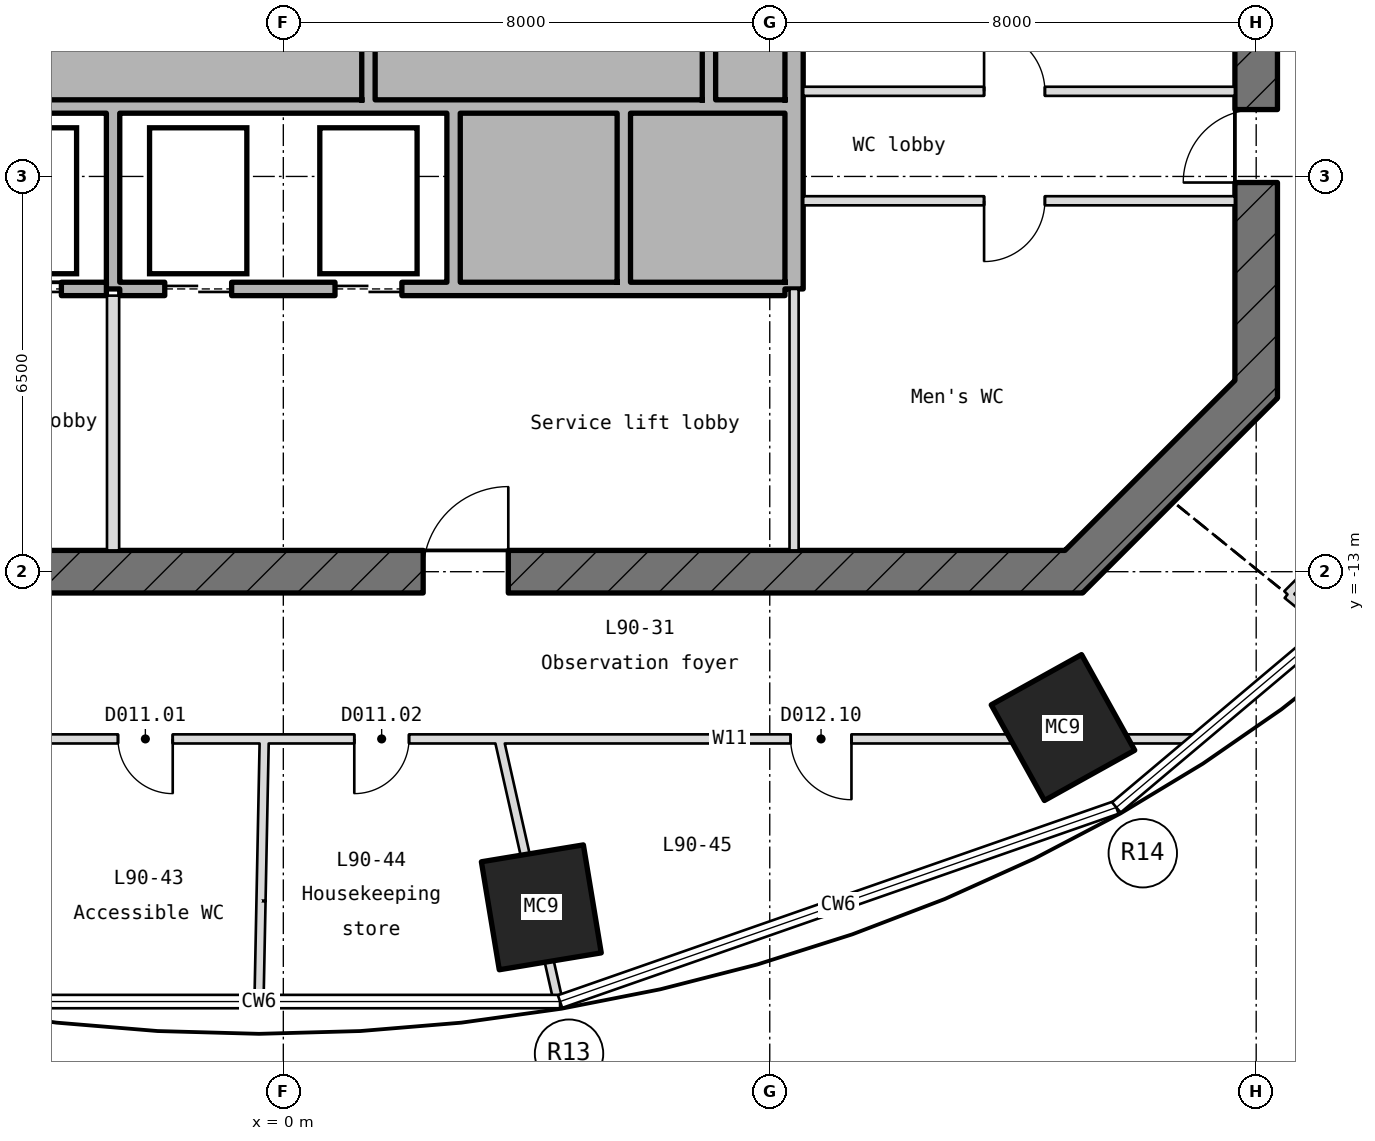
"""IFC4 building model, lengths in metres.
Left out: names, types, materials, properties, quantities, classifications, styles, units other than length and angle.
Written with IfcOpenShell. Run it as: python <this file> out.ifc"""

import sys

from ifc_helpers import new_model, si_unit, direction, frame, frame_2d, origin, origin_2d, place, context, subcontext, project, spatial, rectangle, hollow_rectangle, extrude, element, fill, save


model = new_model("IFC4")
c1 = context("Model", 3, precision=1e-05, world=origin(), true_north=direction((0.0, 1.0)))
c2 = subcontext(c1, "Body", "Model", "MODEL_VIEW")
j1 = project(units=[si_unit("LENGTHUNIT", "METRE"), si_unit("PLANEANGLEUNIT", "RADIAN")], contexts=[c1])
p1 = place(None, origin())
s1 = spatial("IfcSite", under=j1, at=p1, CompositionType="ELEMENT")
p2 = place(p1, origin())
s2 = spatial("IfcBuilding", under=s1, at=p2, CompositionType="ELEMENT")
p3 = place(p2, frame((0.0, 0.0, 396.55)))
s3 = spatial("IfcBuildingStorey", under=s2, at=p3, CompositionType="ELEMENT", Elevation=396.55)
for number, where, z_axis, x_axis in (
    (1, (4.243, -18.52, -0.25), (0.0, 0.0, 1.0), (-0.987, -0.163, 0.0)),
    (2, (12.823, -15.563, -0.25), (0.0, 0.0, 1.0), (-0.874, -0.486, 0.0)),
):
    element("IfcColumn", number, at=place(p3, frame(where, z_axis=z_axis, x_axis=x_axis)), inside=s3, PredefinedType="COLUMN", context=c2, shape_type="SweptSolid", body=[
        extrude(hollow_rectangle(XDim=1.7, YDim=1.8, WallThickness=0.05, at=origin_2d()), origin(), (0.0, 0.0, 1.0), 5.4),
    ])
p4 = place(p3, frame((12.897, -13.103, -0.25), z_axis=(0.0, 0.0, 1.0), x_axis=(0.707106781187, 0.707106781187, 0.0)))
e3 = element("IfcWall", 3, at=p4, inside=s3, PredefinedType="SHEAR", context=c2, shape_type="SweptSolid", body=[
    extrude(rectangle(XDim=4.533, YDim=0.7, at=frame_2d((2.266, 0.0))), origin(), (0.0, 0.0, 1.0), 5.4),
])
p5 = place(p3, frame((16.0, -10.145, -0.25), z_axis=(0.0, 0.0, 1.0), x_axis=(0.0, 1.0, 0.0)))
e4 = element("IfcWall", 4, at=p5, inside=s3, PredefinedType="SHEAR", context=c2, shape_type="SweptSolid", body=[
    extrude(rectangle(XDim=20.29, YDim=0.7, at=frame_2d((10.145, 0.0))), origin(), (0.0, 0.0, 1.0), 5.4),
])
p6 = place(p5, frame((8.945, 0.0, 0.25)))
e5 = element("IfcOpeningElement", 5, at=p6, cuts=e4, PredefinedType="OPENING", context=c2, shape_type="SweptSolid", body=[
    extrude(rectangle(XDim=2.4, YDim=2.1, at=frame_2d((1.2, 1.05))), frame((0.0, 0.36, 0.0), z_axis=(0.0, -1.0, 0.0), x_axis=(1.0, 0.0, 0.0)), (0.0, 0.0, 1.0), 0.72),
])
p7 = place(p5, frame((13.545, 0.0, 0.25)))
e6 = element("IfcOpeningElement", 6, at=p7, cuts=e4, PredefinedType="OPENING", context=c2, shape_type="SweptSolid", body=[
    extrude(rectangle(XDim=1.2, YDim=2.1, at=frame_2d((0.6, 1.05))), frame((0.0, 0.36, 0.0), z_axis=(0.0, -1.0, 0.0), x_axis=(1.0, 0.0, 0.0)), (0.0, 0.0, 1.0), 0.72),
])
p8 = place(p5, frame((3.545, 0.0, 0.25)))
e7 = element("IfcOpeningElement", 7, at=p8, cuts=e4, PredefinedType="OPENING", context=c2, shape_type="SweptSolid", body=[
    extrude(rectangle(XDim=1.2, YDim=2.1, at=frame_2d((0.6, 1.05))), frame((0.0, 0.36, 0.0), z_axis=(0.0, -1.0, 0.0), x_axis=(1.0, 0.0, 0.0)), (0.0, 0.0, 1.0), 0.72),
])
p9 = place(p3, frame((-13.145, -13.0, -0.25), z_axis=(0.0, 0.0, 1.0), x_axis=(1.0, 0.0, 0.0)))
e8 = element("IfcWall", 8, at=p9, inside=s3, PredefinedType="SHEAR", context=c2, shape_type="SweptSolid", body=[
    extrude(rectangle(XDim=26.29, YDim=0.7, at=frame_2d((13.145, 0.0))), origin(), (0.0, 0.0, 1.0), 5.4),
])
p10 = place(p9, frame((2.845, 0.0, 0.25)))
e9 = element("IfcOpeningElement", 9, at=p10, cuts=e8, PredefinedType="OPENING", context=c2, shape_type="SweptSolid", body=[
    extrude(rectangle(XDim=1.2, YDim=2.1, at=frame_2d((0.6, 1.05))), frame((0.0, 0.36, 0.0), z_axis=(0.0, -1.0, 0.0), x_axis=(1.0, 0.0, 0.0)), (0.0, 0.0, 1.0), 0.72),
])
p11 = place(p9, frame((6.845, 0.0, 0.25)))
e10 = element("IfcOpeningElement", 10, at=p11, cuts=e8, PredefinedType="OPENING", context=c2, shape_type="SweptSolid", body=[
    extrude(rectangle(XDim=1.4, YDim=2.1, at=frame_2d((0.7, 1.05))), frame((0.0, 0.36, 0.0), z_axis=(0.0, -1.0, 0.0), x_axis=(1.0, 0.0, 0.0)), (0.0, 0.0, 1.0), 0.72),
])
p12 = place(p9, frame((15.445, 0.0, 0.25)))
e11 = element("IfcOpeningElement", 11, at=p12, cuts=e8, PredefinedType="OPENING", context=c2, shape_type="SweptSolid", body=[
    extrude(rectangle(XDim=1.4, YDim=2.1, at=frame_2d((0.7, 1.05))), frame((0.0, 0.36, 0.0), z_axis=(0.0, -1.0, 0.0), x_axis=(1.0, 0.0, 0.0)), (0.0, 0.0, 1.0), 0.72),
])
p13 = place(p3, frame((-8.25, -8.35, 0.0), z_axis=(0.0, 0.0, 1.0), x_axis=(1.0, 0.0, 0.0)))
e12 = element("IfcWall", 12, at=p13, inside=s3, PredefinedType="STANDARD", context=c2, shape_type="SweptSolid", body=[
    extrude(rectangle(XDim=5.34, YDim=0.22, at=frame_2d((2.67, 0.0))), origin(), (0.0, 0.0, 1.0), 5.15),
])
p14 = place(p13, frame((0.7, 0.0, 0.0)))
e13 = element("IfcOpeningElement", 13, at=p14, cuts=e12, PredefinedType="OPENING", context=c2, shape_type="SweptSolid", body=[
    extrude(rectangle(XDim=1.1, YDim=2.1, at=frame_2d((0.55, 1.05))), frame((0.0, 0.12, 0.0), z_axis=(0.0, -1.0, 0.0), x_axis=(1.0, 0.0, 0.0)), (0.0, 0.0, 1.0), 0.24),
])
p15 = place(p13, frame((3.5, 0.0, 0.0)))
e14 = element("IfcOpeningElement", 14, at=p15, cuts=e12, PredefinedType="OPENING", context=c2, shape_type="SweptSolid", body=[
    extrude(rectangle(XDim=1.1, YDim=2.1, at=frame_2d((0.55, 1.05))), frame((0.0, 0.12, 0.0), z_axis=(0.0, -1.0, 0.0), x_axis=(1.0, 0.0, 0.0)), (0.0, 0.0, 1.0), 0.24),
])
p16 = place(p3, frame((-2.69, -8.35, 0.0), z_axis=(0.0, 0.0, 1.0), x_axis=(1.0, 0.0, 0.0)))
e15 = element("IfcWall", 15, at=p16, inside=s3, PredefinedType="STANDARD", context=c2, shape_type="SweptSolid", body=[
    extrude(rectangle(XDim=10.94, YDim=0.22, at=frame_2d((5.47, 0.0))), origin(), (0.0, 0.0, 1.0), 5.15),
])
p17 = place(p16, frame((0.74, 0.0, 0.0)))
e16 = element("IfcOpeningElement", 16, at=p17, cuts=e15, PredefinedType="OPENING", context=c2, shape_type="SweptSolid", body=[
    extrude(rectangle(XDim=1.1, YDim=2.1, at=frame_2d((0.55, 1.05))), frame((0.0, 0.12, 0.0), z_axis=(0.0, -1.0, 0.0), x_axis=(1.0, 0.0, 0.0)), (0.0, 0.0, 1.0), 0.24),
])
p18 = place(p16, frame((3.54, 0.0, 0.0)))
e17 = element("IfcOpeningElement", 17, at=p18, cuts=e15, PredefinedType="OPENING", context=c2, shape_type="SweptSolid", body=[
    extrude(rectangle(XDim=1.1, YDim=2.1, at=frame_2d((0.55, 1.05))), frame((0.0, 0.12, 0.0), z_axis=(0.0, -1.0, 0.0), x_axis=(1.0, 0.0, 0.0)), (0.0, 0.0, 1.0), 0.24),
])
p19 = place(p3, frame((8.55, -6.9, 0.0), z_axis=(0.0, 0.0, 1.0), x_axis=(1.0, 0.0, 0.0)))
e18 = element("IfcWall", 18, at=p19, inside=s3, PredefinedType="PARTITIONING", context=c2, shape_type="SweptSolid", body=[
    extrude(rectangle(XDim=7.1, YDim=0.15, at=frame_2d((3.55, 0.0))), origin(), (0.0, 0.0, 1.0), 5.15),
])
p20 = place(p19, frame((2.975, 0.0, 0.0)))
e19 = element("IfcOpeningElement", 19, at=p20, cuts=e18, PredefinedType="OPENING", context=c2, shape_type="SweptSolid", body=[
    extrude(rectangle(XDim=1.0, YDim=2.1, at=frame_2d((0.5, 1.05))), frame((0.0, 0.085, 0.0), z_axis=(0.0, -1.0, 0.0), x_axis=(1.0, 0.0, 0.0)), (0.0, 0.0, 1.0), 0.17),
])
p21 = place(p3, frame((-8.25, -5.35, 0.0), z_axis=(0.0, 0.0, 1.0), x_axis=(1.0, 0.0, 0.0)))
e20 = element("IfcWall", 20, at=p21, inside=s3, PredefinedType="STANDARD", context=c2, shape_type="SweptSolid", body=[
    extrude(rectangle(XDim=16.5, YDim=0.22, at=frame_2d((8.25, 0.0))), origin(), (0.0, 0.0, 1.0), 5.15),
])
p22 = place(p3, frame((8.55, -5.1, 0.0), z_axis=(0.0, 0.0, 1.0), x_axis=(1.0, 0.0, 0.0)))
e21 = element("IfcWall", 21, at=p22, inside=s3, PredefinedType="PARTITIONING", context=c2, shape_type="SweptSolid", body=[
    extrude(rectangle(XDim=7.1, YDim=0.15, at=frame_2d((3.55, 0.0))), origin(), (0.0, 0.0, 1.0), 5.15),
])
p23 = place(p22, frame((2.975, 0.0, 0.0)))
e22 = element("IfcOpeningElement", 22, at=p23, cuts=e21, PredefinedType="OPENING", context=c2, shape_type="SweptSolid", body=[
    extrude(rectangle(XDim=1.0, YDim=2.1, at=frame_2d((0.5, 1.05))), frame((0.0, 0.085, 0.0), z_axis=(0.0, -1.0, 0.0), x_axis=(1.0, 0.0, 0.0)), (0.0, 0.0, 1.0), 0.17),
])
p24 = place(p3, frame((-2.8, -12.65, 0.0), z_axis=(0.0, 0.0, 1.0), x_axis=(0.0, 1.0, 0.0)))
e23 = element("IfcWall", 23, at=p24, inside=s3, PredefinedType="PARTITIONING", context=c2, shape_type="SweptSolid", body=[
    extrude(rectangle(XDim=4.19, YDim=0.2, at=frame_2d((2.095, 0.0))), origin(), (0.0, 0.0, 1.0), 5.15),
])
p25 = place(p3, frame((-2.8, -8.35, 0.0), z_axis=(0.0, 0.0, 1.0), x_axis=(0.0, 1.0, 0.0)))
e24 = element("IfcWall", 24, at=p25, inside=s3, PredefinedType="STANDARD", context=c2, shape_type="SweptSolid", body=[
    extrude(rectangle(XDim=2.89, YDim=0.22, at=frame_2d((1.445, 0.0))), origin(), (0.0, 0.0, 1.0), 5.15),
])
p26 = place(p3, frame((1.4, -5.24, 0.0), z_axis=(0.0, 0.0, 1.0), x_axis=(0.0, 1.0, 0.0)))
e25 = element("IfcWall", 25, at=p26, inside=s3, PredefinedType="STANDARD", context=c2, shape_type="SweptSolid", body=[
    extrude(rectangle(XDim=2.74, YDim=0.22, at=frame_2d((1.37, 0.0))), origin(), (0.0, 0.0, 1.0), 5.15),
])
for number, where, z_axis, x_axis in (
    (26, (2.8, -8.24, 0.0), (0.0, 0.0, 1.0), (0.0, 1.0, 0.0)),
    (27, (5.6, -8.24, 0.0), (0.0, 0.0, 1.0), (0.0, 1.0, 0.0)),
):
    element("IfcWall", number, at=place(p3, frame(where, z_axis=z_axis, x_axis=x_axis)), inside=s3, PredefinedType="STANDARD", context=c2, shape_type="SweptSolid", body=[
        extrude(rectangle(XDim=2.78, YDim=0.22, at=frame_2d((1.39, 0.0))), origin(), (0.0, 0.0, 1.0), 5.15),
    ])
p27 = place(p3, frame((7.0, -5.24, 0.0), z_axis=(0.0, 0.0, 1.0), x_axis=(0.0, 1.0, 0.0)))
e28 = element("IfcWall", 28, at=p27, inside=s3, PredefinedType="STANDARD", context=c2, shape_type="SweptSolid", body=[
    extrude(rectangle(XDim=2.74, YDim=0.22, at=frame_2d((1.37, 0.0))), origin(), (0.0, 0.0, 1.0), 5.15),
])
p28 = place(p3, frame((8.4, -12.65, 0.0), z_axis=(0.0, 0.0, 1.0), x_axis=(0.0, 1.0, 0.0)))
e29 = element("IfcWall", 29, at=p28, inside=s3, PredefinedType="PARTITIONING", context=c2, shape_type="SweptSolid", body=[
    extrude(rectangle(XDim=4.3, YDim=0.15, at=frame_2d((2.15, 0.0))), origin(), (0.0, 0.0, 1.0), 5.15),
])
p29 = place(p3, frame((8.4, -8.35, -0.25), z_axis=(0.0, 0.0, 1.0), x_axis=(0.0, 1.0, 0.0)))
e30 = element("IfcWall", 30, at=p29, inside=s3, PredefinedType="SHEAR", context=c2, shape_type="SweptSolid", body=[
    extrude(rectangle(XDim=5.85, YDim=0.3, at=frame_2d((2.925, 0.0))), origin(), (0.0, 0.0, 1.0), 5.4),
])
p30 = place(p3, frame((-0.319, -15.75, 0.0), z_axis=(0.0, 0.0, 1.0), x_axis=(1.0, 0.0, 0.0)))
e31 = element("IfcWall", 31, at=p30, inside=s3, PredefinedType="PARTITIONING", context=c2, shape_type="SweptSolid", body=[
    extrude(rectangle(XDim=15.326, YDim=0.15, at=frame_2d((7.663, 0.0))), origin(), (0.0, 0.0, 1.0), 5.15),
])
p31 = place(p30, frame((1.486, 0.0, 0.0)))
e32 = element("IfcOpeningElement", 32, at=p31, cuts=e31, PredefinedType="OPENING", context=c2, shape_type="SweptSolid", body=[
    extrude(rectangle(XDim=0.9, YDim=2.1, at=frame_2d((0.45, 1.05))), frame((0.0, 0.085, 0.0), z_axis=(0.0, -1.0, 0.0), x_axis=(1.0, 0.0, 0.0)), (0.0, 0.0, 1.0), 0.17),
])
p32 = place(p30, frame((8.663, 0.0, 0.0)))
e33 = element("IfcOpeningElement", 33, at=p32, cuts=e31, PredefinedType="OPENING", context=c2, shape_type="SweptSolid", body=[
    extrude(rectangle(XDim=1.0, YDim=2.1, at=frame_2d((0.5, 1.05))), frame((0.0, 0.085, 0.0), z_axis=(0.0, -1.0, 0.0), x_axis=(1.0, 0.0, 0.0)), (0.0, 0.0, 1.0), 0.17),
])
p33 = place(p3, frame((16.515, -13.374, 0.0), z_axis=(0.0, 0.0, 1.0), x_axis=(0.707106781187, 0.707106781187, 0.0)))
e34 = element("IfcWall", 34, at=p33, inside=s3, PredefinedType="PARTITIONING", context=c2, shape_type="SweptSolid", body=[
    extrude(rectangle(XDim=3.16, YDim=0.15, at=frame_2d((1.58, 0.0))), origin(), (0.0, 0.0, 1.0), 5.15),
])
p34 = place(p3, frame((4.517, -20.049, 0.0), z_axis=(0.0, 0.0, 1.0), x_axis=(-0.21980060665, 0.975544818712, 0.0)))
e35 = element("IfcWall", 35, at=p34, inside=s3, PredefinedType="PARTITIONING", context=c2, shape_type="SweptSolid", body=[
    extrude(rectangle(XDim=1.954, YDim=0.15, at=frame_2d((0.977, 0.0))), origin(), (0.0, 0.0, 1.0), 5.15),
])
p35 = place(p3, frame((4.087, -18.143, 0.0), z_axis=(0.0, 0.0, 1.0), x_axis=(-0.219732416391, 0.975560180198, 0.0)))
e36 = element("IfcWall", 36, at=p35, inside=s3, PredefinedType="PARTITIONING", context=c2, shape_type="SweptSolid", body=[
    extrude(rectangle(XDim=2.453, YDim=0.15, at=frame_2d((1.227, 0.0))), origin(), (0.0, 0.0, 1.0), 4.797),
])
p36 = place(p3, frame((17.185, -13.916, 0.0), z_axis=(0.0, 0.0, 1.0), x_axis=(-0.77706665064, 0.629418319136, 0.0)))
e37 = element("IfcWall", 37, at=p36, inside=s3, PredefinedType="PARTITIONING", context=c2, shape_type="SweptSolid", body=[
    extrude(rectangle(XDim=0.862, YDim=0.15, at=frame_2d((0.431, 0.0))), origin(), (0.0, 0.0, 1.0), 5.15),
])
p37 = place(p3, frame((-13.569, -15.75, 0.0), z_axis=(0.0, 0.0, 1.0), x_axis=(1.0, 0.0, 0.0)))
e38 = element("IfcWall", 38, at=p37, inside=s3, PredefinedType="PARTITIONING", context=c2, shape_type="SweptSolid", body=[
    extrude(rectangle(XDim=13.26, YDim=0.15, at=frame_2d((6.63, 0.0))), origin(), (0.0, 0.0, 1.0), 5.15),
])
p38 = place(p37, frame((4.173, 0.0, 0.0)))
e39 = element("IfcOpeningElement", 39, at=p38, cuts=e38, PredefinedType="OPENING", context=c2, shape_type="SweptSolid", body=[
    extrude(rectangle(XDim=1.0, YDim=2.1, at=frame_2d((0.5, 1.05))), frame((0.0, 0.085, 0.0), z_axis=(0.0, -1.0, 0.0), x_axis=(1.0, 0.0, 0.0)), (0.0, 0.0, 1.0), 0.17),
])
p39 = place(p37, frame((10.85, 0.0, 0.0)))
e40 = element("IfcOpeningElement", 40, at=p39, cuts=e38, PredefinedType="OPENING", context=c2, shape_type="SweptSolid", body=[
    extrude(rectangle(XDim=0.9, YDim=2.1, at=frame_2d((0.45, 1.05))), frame((0.0, 0.085, 0.0), z_axis=(0.0, -1.0, 0.0), x_axis=(1.0, 0.0, 0.0)), (0.0, 0.0, 1.0), 0.17),
])
p40 = place(p3, frame((-0.4, -20.049, 0.0), z_axis=(0.0, 0.0, 1.0), x_axis=(0.02000495506, 0.999799880863, 0.0)))
e41 = element("IfcWall", 41, at=p40, inside=s3, PredefinedType="PARTITIONING", context=c2, shape_type="SweptSolid", body=[
    extrude(rectangle(XDim=1.635, YDim=0.15, at=frame_2d((0.818, 0.0))), origin(), (0.0, 0.0, 1.0), 5.15),
])
p41 = place(p3, frame((-0.367, -18.414, 0.0), z_axis=(0.0, 0.0, 1.0), x_axis=(0.019880611414, 0.999802361114, 0.0)))
e42 = element("IfcWall", 42, at=p41, inside=s3, PredefinedType="PARTITIONING", context=c2, shape_type="SweptSolid", body=[
    extrude(rectangle(XDim=2.665, YDim=0.15, at=frame_2d((1.333, 0.0))), origin(), (0.0, 0.0, 1.0), 4.84),
])
p42 = place(p15, origin())
e43 = element("IfcDoor", 43, at=p42, inside=s3, OperationType="DOUBLE_DOOR_SLIDING", PredefinedType="DOOR", context=c2, shape_type="SweptSolid", body=[
    extrude(rectangle(XDim=1.1, YDim=2.1, at=frame_2d((0.55, 1.05))), frame((0.0, 0.025, 0.0), z_axis=(0.0, -1.0, 0.0), x_axis=(1.0, 0.0, 0.0)), (0.0, 0.0, 1.0), 0.05),
])
fill(e14, e43)
p43 = place(p17, origin())
e44 = element("IfcDoor", 44, at=p43, inside=s3, OperationType="DOUBLE_DOOR_SLIDING", PredefinedType="DOOR", context=c2, shape_type="SweptSolid", body=[
    extrude(rectangle(XDim=1.1, YDim=2.1, at=frame_2d((0.55, 1.05))), frame((0.0, 0.025, 0.0), z_axis=(0.0, -1.0, 0.0), x_axis=(1.0, 0.0, 0.0)), (0.0, 0.0, 1.0), 0.05),
])
fill(e16, e44)
p44 = place(p18, origin())
e45 = element("IfcDoor", 45, at=p44, inside=s3, OperationType="DOUBLE_DOOR_SLIDING", PredefinedType="DOOR", context=c2, shape_type="SweptSolid", body=[
    extrude(rectangle(XDim=1.1, YDim=2.1, at=frame_2d((0.55, 1.05))), frame((0.0, 0.025, 0.0), z_axis=(0.0, -1.0, 0.0), x_axis=(1.0, 0.0, 0.0)), (0.0, 0.0, 1.0), 0.05),
])
fill(e17, e45)
p45 = place(p12, origin())
e46 = element("IfcDoor", 46, at=p45, inside=s3, OperationType="SINGLE_SWING_RIGHT", PredefinedType="DOOR", context=c2, shape_type="SweptSolid", body=[
    extrude(rectangle(XDim=1.4, YDim=2.1, at=frame_2d((0.7, 1.05))), frame((0.0, 0.025, 0.0), z_axis=(0.0, -1.0, 0.0), x_axis=(1.0, 0.0, 0.0)), (0.0, 0.0, 1.0), 0.05),
])
fill(e11, e46)
p46 = place(p23, origin())
e47 = element("IfcDoor", 47, at=p46, inside=s3, OperationType="SINGLE_SWING_RIGHT", PredefinedType="DOOR", context=c2, shape_type="SweptSolid", body=[
    extrude(rectangle(XDim=1.0, YDim=2.1, at=frame_2d((0.5, 1.05))), frame((0.0, 0.025, 0.0), z_axis=(0.0, -1.0, 0.0), x_axis=(1.0, 0.0, 0.0)), (0.0, 0.0, 1.0), 0.05),
])
fill(e22, e47)
p47 = place(p8, origin())
e48 = element("IfcDoor", 48, at=p47, inside=s3, OperationType="SINGLE_SWING_RIGHT", PredefinedType="DOOR", context=c2, shape_type="SweptSolid", body=[
    extrude(rectangle(XDim=1.2, YDim=2.1, at=frame_2d((0.6, 1.05))), frame((0.0, 0.025, 0.0), z_axis=(0.0, -1.0, 0.0), x_axis=(1.0, 0.0, 0.0)), (0.0, 0.0, 1.0), 0.05),
])
fill(e7, e48)
p48 = place(p20, frame((1.0, 0.0, 0.0), z_axis=(0.0, 0.0, 1.0), x_axis=(-1.0, 0.0, 0.0)))
e49 = element("IfcDoor", 49, at=p48, inside=s3, OperationType="SINGLE_SWING_LEFT", PredefinedType="DOOR", context=c2, shape_type="SweptSolid", body=[
    extrude(rectangle(XDim=1.0, YDim=2.1, at=frame_2d((0.5, 1.05))), frame((0.0, 0.025, 0.0), z_axis=(0.0, -1.0, 0.0), x_axis=(1.0, 0.0, 0.0)), (0.0, 0.0, 1.0), 0.05),
])
fill(e19, e49)
p49 = place(p39, frame((0.9, 0.0, 0.0), z_axis=(0.0, 0.0, 1.0), x_axis=(-1.0, 0.0, 0.0)))
e50 = element("IfcDoor", 50, at=p49, inside=s3, OperationType="SINGLE_SWING_LEFT", PredefinedType="DOOR", context=c2, shape_type="SweptSolid", body=[
    extrude(rectangle(XDim=0.9, YDim=2.1, at=frame_2d((0.45, 1.05))), frame((0.0, 0.025, 0.0), z_axis=(0.0, -1.0, 0.0), x_axis=(1.0, 0.0, 0.0)), (0.0, 0.0, 1.0), 0.05),
])
fill(e40, e50)
p50 = place(p31, frame((0.9, 0.0, 0.0), z_axis=(0.0, 0.0, 1.0), x_axis=(-1.0, 0.0, 0.0)))
e51 = element("IfcDoor", 51, at=p50, inside=s3, OperationType="SINGLE_SWING_LEFT", PredefinedType="DOOR", context=c2, shape_type="SweptSolid", body=[
    extrude(rectangle(XDim=0.9, YDim=2.1, at=frame_2d((0.45, 1.05))), frame((0.0, 0.025, 0.0), z_axis=(0.0, -1.0, 0.0), x_axis=(1.0, 0.0, 0.0)), (0.0, 0.0, 1.0), 0.05),
])
fill(e32, e51)
p51 = place(p32, frame((1.0, 0.0, 0.0), z_axis=(0.0, 0.0, 1.0), x_axis=(-1.0, 0.0, 0.0)))
e52 = element("IfcDoor", 52, at=p51, inside=s3, OperationType="SINGLE_SWING_LEFT", PredefinedType="DOOR", context=c2, shape_type="SweptSolid", body=[
    extrude(rectangle(XDim=1.0, YDim=2.1, at=frame_2d((0.5, 1.05))), frame((0.0, 0.025, 0.0), z_axis=(0.0, -1.0, 0.0), x_axis=(1.0, 0.0, 0.0)), (0.0, 0.0, 1.0), 0.05),
])
fill(e33, e52)
save(model, sys.argv[1])
